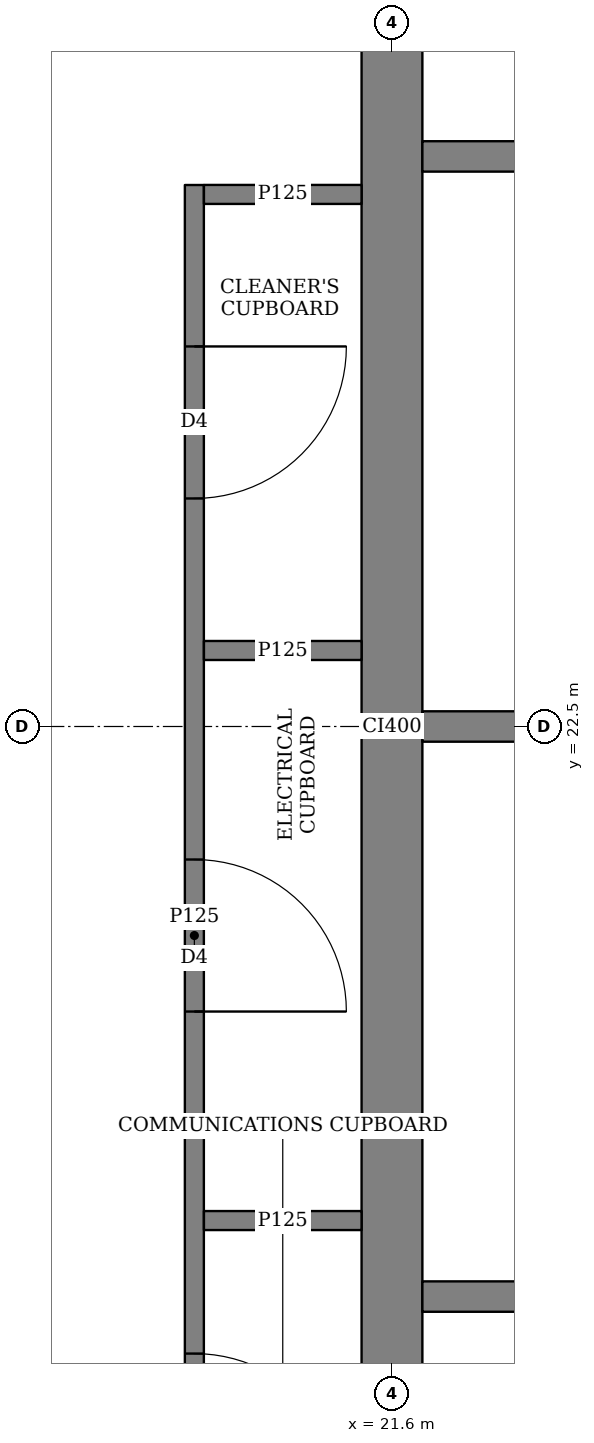
"""IFC4 building model, lengths in metres.
Left out: names, types, materials, properties, quantities, classifications, styles, units other than length and angle.
Written with IfcOpenShell. Run it as: python <this file> out.ifc"""

import sys

from ifc_helpers import new_model, si_unit, direction, frame, frame_2d, origin, place, context, subcontext, project, spatial, rectangle, extrude, element, fill, save


model = new_model("IFC4")
c1 = context("Model", 3, precision=1e-05, world=origin(), true_north=direction((0.0, 1.0)))
c2 = subcontext(c1, "Body", "Model", "MODEL_VIEW")
j1 = project(units=[si_unit("LENGTHUNIT", "METRE"), si_unit("PLANEANGLEUNIT", "RADIAN")], contexts=[c1])
p1 = place(None, origin())
s1 = spatial("IfcSite", under=j1, at=p1, CompositionType="ELEMENT")
p2 = place(p1, origin())
s2 = spatial("IfcBuilding", under=s1, at=p2, CompositionType="ELEMENT")
p3 = place(p2, frame((0.0, 0.0, 81.65)))
s3 = spatial("IfcBuildingStorey", under=s2, at=p3, CompositionType="ELEMENT", Elevation=81.65)
p4 = place(p3, frame((21.6, 15.45, 0.0), z_axis=(0.0, 0.0, 1.0), x_axis=(0.0, 1.0, 0.0)))
e1 = element("IfcWall", 1, at=p4, inside=s3, PredefinedType="SHEAR", context=c2, shape_type="SweptSolid", body=[
    extrude(rectangle(XDim=14.1, YDim=0.4, at=frame_2d((7.05, 0.0))), origin(), (0.0, 0.0, 1.0), 3.75),
])
p5 = place(p3, frame((20.3, 16.438, 0.0), z_axis=(0.0, 0.0, 1.0), x_axis=(0.0, 1.0, 0.0)))
e2 = element("IfcWall", 2, at=p5, inside=s3, PredefinedType="PARTITIONING", context=c2, shape_type="SweptSolid", body=[
    extrude(rectangle(XDim=9.624, YDim=0.125, at=frame_2d((4.812, 0.0))), origin(), (0.0, 0.0, 1.0), 3.5),
])
p6 = place(p5, frame((0.937, 0.0, 0.0)))
e3 = element("IfcOpeningElement", 3, at=p6, cuts=e2, PredefinedType="OPENING", context=c2, shape_type="SweptSolid", body=[
    extrude(rectangle(XDim=1.0, YDim=2.1, at=frame_2d((0.5, 1.05))), frame((0.0, 0.073, 0.0), z_axis=(0.0, -1.0, 0.0), x_axis=(1.0, 0.0, 0.0)), (0.0, 0.0, 1.0), 0.145),
])
p7 = place(p5, frame((4.187, 0.0, 0.0)))
e4 = element("IfcOpeningElement", 4, at=p7, cuts=e2, PredefinedType="OPENING", context=c2, shape_type="SweptSolid", body=[
    extrude(rectangle(XDim=1.0, YDim=2.1, at=frame_2d((0.5, 1.05))), frame((0.0, 0.073, 0.0), z_axis=(0.0, -1.0, 0.0), x_axis=(1.0, 0.0, 0.0)), (0.0, 0.0, 1.0), 0.145),
])
p8 = place(p5, frame((7.562, 0.0, 0.0)))
e5 = element("IfcOpeningElement", 5, at=p8, cuts=e2, PredefinedType="OPENING", context=c2, shape_type="SweptSolid", body=[
    extrude(rectangle(XDim=1.0, YDim=2.1, at=frame_2d((0.5, 1.05))), frame((0.0, 0.073, 0.0), z_axis=(0.0, -1.0, 0.0), x_axis=(1.0, 0.0, 0.0)), (0.0, 0.0, 1.0), 0.145),
])
for number, where, z_axis, x_axis in (
    (6, (20.363, 26.0, 0.0), (0.0, 0.0, 1.0), (1.0, 0.0, 0.0)),
    (7, (20.363, 19.25, 0.0), (0.0, 0.0, 1.0), (1.0, 0.0, 0.0)),
    (8, (20.363, 23.0, 0.0), (0.0, 0.0, 1.0), (1.0, 0.0, 0.0)),
):
    element("IfcWall", number, at=place(p3, frame(where, z_axis=z_axis, x_axis=x_axis)), inside=s3, PredefinedType="PARTITIONING", context=c2, shape_type="SweptSolid", body=[
        extrude(rectangle(XDim=1.037, YDim=0.125, at=frame_2d((0.519, 0.0))), origin(), (0.0, 0.0, 1.0), 3.5),
    ])
for number, where, z_axis, x_axis in (
    (9, (21.8, 18.75, 0.0), (0.0, 0.0, 1.0), (1.0, 0.0, 0.0)),
    (10, (21.8, 22.5, 0.0), (0.0, 0.0, 1.0), (1.0, 0.0, 0.0)),
    (11, (21.8, 26.25, 0.0), (0.0, 0.0, 1.0), (1.0, 0.0, 0.0)),
):
    element("IfcWall", number, at=place(p3, frame(where, z_axis=z_axis, x_axis=x_axis)), inside=s3, PredefinedType="SOLIDWALL", context=c2, shape_type="SweptSolid", body=[
        extrude(rectangle(XDim=2.2, YDim=0.2, at=frame_2d((1.1, 0.0))), origin(), (0.0, 0.0, 1.0), 3.5),
    ])
p9 = place(p6, origin())
e12 = element("IfcDoor", 12, at=p9, inside=s3, OperationType="SINGLE_SWING_RIGHT", PredefinedType="DOOR", context=c2, shape_type="SweptSolid", body=[
    extrude(rectangle(XDim=1.0, YDim=2.1, at=frame_2d((0.5, 1.05))), frame((0.0, 0.025, 0.0), z_axis=(0.0, -1.0, 0.0), x_axis=(1.0, 0.0, 0.0)), (0.0, 0.0, 1.0), 0.05),
])
fill(e3, e12)
p10 = place(p7, origin())
e13 = element("IfcDoor", 13, at=p10, inside=s3, OperationType="SINGLE_SWING_RIGHT", PredefinedType="DOOR", context=c2, shape_type="SweptSolid", body=[
    extrude(rectangle(XDim=1.0, YDim=2.1, at=frame_2d((0.5, 1.05))), frame((0.0, 0.025, 0.0), z_axis=(0.0, -1.0, 0.0), x_axis=(1.0, 0.0, 0.0)), (0.0, 0.0, 1.0), 0.05),
])
fill(e4, e13)
p11 = place(p8, origin())
e14 = element("IfcDoor", 14, at=p11, inside=s3, OperationType="SINGLE_SWING_LEFT", PredefinedType="DOOR", context=c2, shape_type="SweptSolid", body=[
    extrude(rectangle(XDim=1.0, YDim=2.1, at=frame_2d((0.5, 1.05))), frame((0.0, 0.025, 0.0), z_axis=(0.0, -1.0, 0.0), x_axis=(1.0, 0.0, 0.0)), (0.0, 0.0, 1.0), 0.05),
])
fill(e5, e14)
save(model, sys.argv[1])
